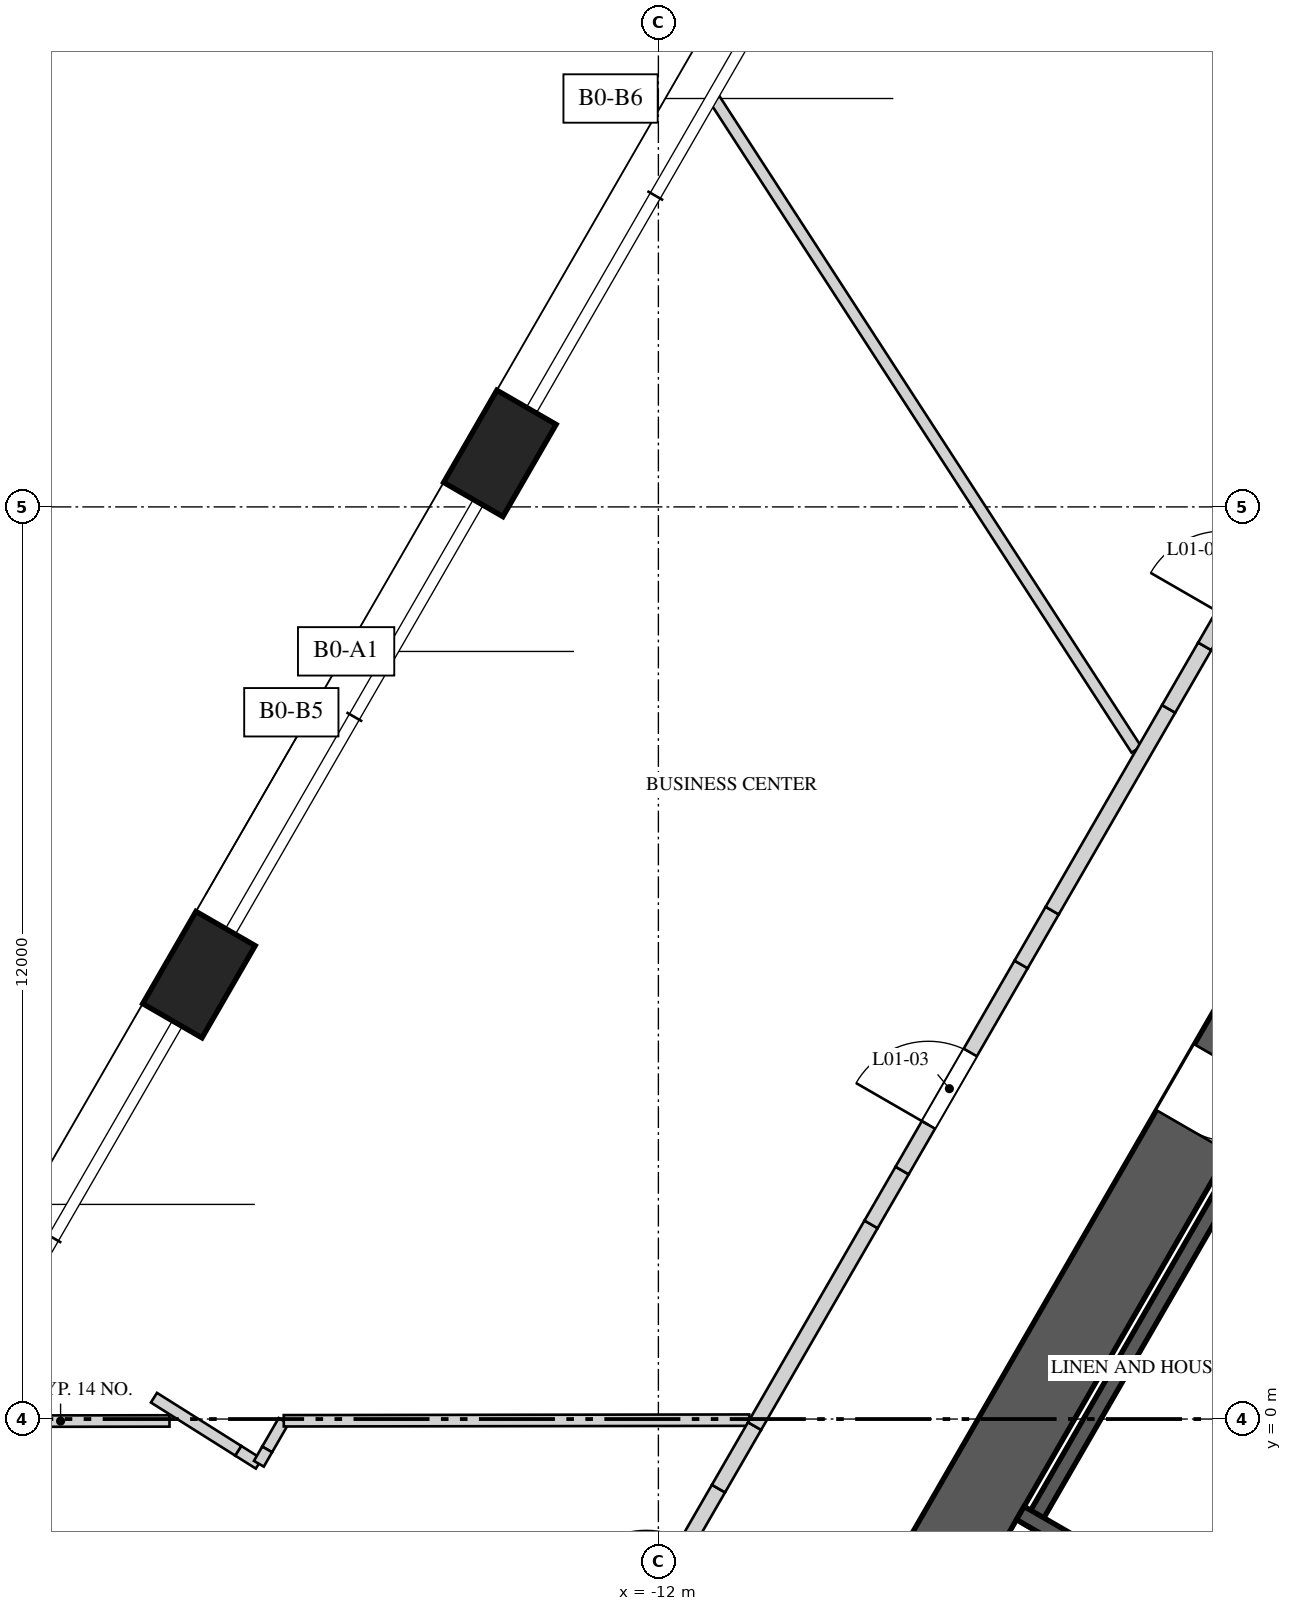
"""IFC4 building model, lengths in metres.
Left out: names, types, materials, properties, quantities, classifications, styles, units other than length and angle.
Written with IfcOpenShell. Run it as: python <this file> out.ifc"""

import sys

from ifc_helpers import new_model, si_unit, direction, frame, frame_2d, origin, origin_2d, place, context, subcontext, project, spatial, rectangle, extrude, element, fill, save


model = new_model("IFC4")
c1 = context("Model", 3, precision=1e-05, world=origin(), true_north=direction((0.0, 1.0)))
c2 = subcontext(c1, "Body", "Model", "MODEL_VIEW")
j1 = project(units=[si_unit("LENGTHUNIT", "METRE"), si_unit("PLANEANGLEUNIT", "RADIAN")], contexts=[c1])
p1 = place(None, origin())
s1 = spatial("IfcSite", under=j1, at=p1, CompositionType="ELEMENT")
p2 = place(p1, origin())
s2 = spatial("IfcBuilding", under=s1, at=p2, CompositionType="ELEMENT")
p3 = place(p2, frame((0.0, 0.0, 10.0)))
s3 = spatial("IfcBuildingStorey", under=s2, at=p3, CompositionType="ELEMENT", Elevation=10.0)
p4 = place(p3, frame((-1.126, 10.45, 0.0), z_axis=(0.0, 0.0, 1.0), x_axis=(-0.500001757713, -0.866024388966, 0.0)))
e1 = element("IfcWall", 1, at=p4, inside=s3, PredefinedType="SHEAR", context=c2, shape_type="SweptSolid", body=[
    extrude(rectangle(XDim=16.974, YDim=1.1, at=frame_2d((8.487, 0.0))), origin(), (0.0, 0.0, 1.0), 5.0),
])
p5 = place(p4, frame((6.692, 0.0, 0.0)))
e2 = element("IfcOpeningElement", 2, at=p5, cuts=e1, PredefinedType="OPENING", context=c2, shape_type="SweptSolid", body=[
    extrude(rectangle(XDim=1.0, YDim=2.4, at=frame_2d((0.5, 1.2))), frame((0.0, 0.56, 0.0), z_axis=(0.0, -1.0, 0.0), x_axis=(1.0, 0.0, 0.0)), (0.0, 0.0, 1.0), 1.12),
])
p6 = place(p4, frame((14.397, 0.0, 0.0)))
e3 = element("IfcOpeningElement", 3, at=p6, cuts=e1, PredefinedType="OPENING", context=c2, shape_type="SweptSolid", body=[
    extrude(rectangle(XDim=0.8, YDim=2.1, at=frame_2d((0.4, 1.05))), frame((0.0, 0.56, 0.0), z_axis=(0.0, -1.0, 0.0), x_axis=(1.0, 0.0, 0.0)), (0.0, 0.0, 1.0), 1.12),
])
for number, where, z_axis, x_axis in (
    (4, (-14.085, 12.704, 0.0), (0.0, 0.0, 1.0), (-0.5, -0.866, 0.0)),
    (5, (-18.044, 5.846, 0.0), (0.0, 0.0, 1.0), (-0.5, -0.866, 0.0)),
):
    element("IfcColumn", number, at=place(p3, frame(where, z_axis=z_axis, x_axis=x_axis)), inside=s3, PredefinedType="COLUMN", context=c2, shape_type="SweptSolid", body=[
        extrude(rectangle(XDim=1.4, YDim=0.9, at=origin_2d()), origin(), (0.0, 0.0, 1.0), 5.0),
    ])
p7 = place(p3, frame((-4.993, -2.648, 0.0), z_axis=(0.0, 0.0, 1.0), x_axis=(0.499996545922, 0.866027397988, 0.0)))
e6 = element("IfcWall", 6, at=p7, inside=s3, PredefinedType="SOLIDWALL", context=c2, shape_type="SweptSolid", body=[
    extrude(rectangle(XDim=5.5, YDim=0.2, at=frame_2d((2.75, 0.0))), origin(), (0.0, 0.0, 1.0), 4.65),
])
p8 = place(p7, frame((2.275, 0.0, 0.0)))
e7 = element("IfcOpeningElement", 7, at=p8, cuts=e6, PredefinedType="OPENING", context=c2, shape_type="SweptSolid", body=[
    extrude(rectangle(XDim=0.95, YDim=2.4, at=frame_2d((0.475, 1.2))), frame((0.0, 0.11, 0.0), z_axis=(0.0, -1.0, 0.0), x_axis=(1.0, 0.0, 0.0)), (0.0, 0.0, 1.0), 0.22),
])
p9 = place(p3, frame((-4.365, 3.34, 0.0), z_axis=(0.0, 0.0, 1.0), x_axis=(-0.499996545922, -0.866027397988, 0.0)))
e8 = element("IfcWall", 8, at=p9, inside=s3, PredefinedType="SOLIDWALL", context=c2, shape_type="SweptSolid", body=[
    extrude(rectangle(XDim=5.5, YDim=0.2, at=frame_2d((2.75, 0.0))), origin(), (0.0, 0.0, 1.0), 4.65),
])
p10 = place(p3, frame((-5.03, -2.512, 0.0), z_axis=(0.0, 0.0, 1.0), x_axis=(-0.865989465428, 0.500062241894, 0.0)))
e9 = element("IfcWall", 9, at=p10, inside=s3, PredefinedType="SOLIDWALL", context=c2, shape_type="SweptSolid", body=[
    extrude(rectangle(XDim=2.55, YDim=0.2, at=frame_2d((1.275, 0.0))), origin(), (0.0, 0.0, 1.0), 4.65),
])
p11 = place(p3, frame((-18.432, -0.025, 0.0), z_axis=(0.0, 0.0, 1.0), x_axis=(-0.999999071147, -0.001362976841, 0.0)))
e10 = element("IfcWall", 10, at=p11, inside=s3, PredefinedType="PARTITIONING", context=c2, shape_type="SweptSolid", body=[
    extrude(rectangle(XDim=2.866, YDim=0.15, at=frame_2d((1.433, 0.0))), origin(), (0.0, 0.0, 1.0), 4.65),
])
p12 = place(p3, frame((-17.256, -0.588, 0.0), z_axis=(0.0, 0.0, 1.0), x_axis=(-0.846156657223, 0.532934246823, 0.0)))
e11 = element("IfcWall", 11, at=p12, inside=s3, PredefinedType="PARTITIONING", context=c2, shape_type="SweptSolid", body=[
    extrude(rectangle(XDim=0.321, YDim=0.15, at=frame_2d((0.161, 0.0))), origin(), (0.0, 0.0, 1.0), 3.75),
])
p13 = place(p3, frame((-17.528, -0.417, 0.0), z_axis=(0.0, 0.0, 1.0), x_axis=(-0.846108327914, 0.533010973091, 0.0)))
e12 = element("IfcWall", 12, at=p13, inside=s3, PredefinedType="PARTITIONING", context=c2, shape_type="SweptSolid", body=[
    extrude(rectangle(XDim=1.31, YDim=0.15, at=frame_2d((0.655, 0.0))), origin(), (0.0, 0.0, 1.0), 4.65),
])
p14 = place(p3, frame((-16.93, -0.024, 0.0), z_axis=(0.0, 0.0, 1.0), x_axis=(-0.500193229689, -0.865913813825, 0.0)))
e13 = element("IfcWall", 13, at=p14, inside=s3, PredefinedType="PARTITIONING", context=c2, shape_type="SweptSolid", body=[
    extrude(rectangle(XDim=0.434, YDim=0.15, at=frame_2d((0.217, 0.0))), origin(), (0.0, 0.0, 1.0), 4.65),
])
p15 = place(p3, frame((-17.147, -0.4, 0.0), z_axis=(0.0, 0.0, 1.0), x_axis=(-0.499754787977, -0.866166930732, 0.0)))
e14 = element("IfcWall", 14, at=p15, inside=s3, PredefinedType="PARTITIONING", context=c2, shape_type="SweptSolid", body=[
    extrude(rectangle(XDim=0.218, YDim=0.15, at=frame_2d((0.109, 0.0))), origin(), (0.0, 0.0, 1.0), 3.75),
])
p16 = place(p3, frame((-10.805, -0.015, 0.0), z_axis=(0.0, 0.0, 1.0), x_axis=(-0.999999081238, -0.001355552538, 0.0)))
e15 = element("IfcWall", 15, at=p16, inside=s3, PredefinedType="PARTITIONING", context=c2, shape_type="SweptSolid", body=[
    extrude(rectangle(XDim=6.124, YDim=0.15, at=frame_2d((3.062, 0.0))), origin(), (0.0, 0.0, 1.0), 4.65),
])
p17 = place(p3, frame((-5.711, 8.808, 0.0), z_axis=(0.0, 0.0, 1.0), x_axis=(-0.544077203012, 0.839035158478, 0.0)))
e16 = element("IfcWall", 16, at=p17, inside=s3, PredefinedType="PARTITIONING", context=c2, shape_type="SweptSolid", body=[
    extrude(rectangle(XDim=10.194, YDim=0.15, at=frame_2d((5.097, 0.0))), origin(), (0.0, 0.0, 1.0), 4.65),
])
p18 = place(p3, frame((-12.617, -3.354, 0.0), z_axis=(0.0, 0.0, 1.0), x_axis=(0.49993514545, 0.866062844338, 0.0)))
e17 = element("IfcWall", 17, at=p18, inside=s3, PredefinedType="SOLIDWALL", context=c2, shape_type="SweptSolid", body=[
    extrude(rectangle(XDim=2.815, YDim=0.2, at=frame_2d((1.408, 0.0))), origin(), (0.0, 0.0, 1.0), 4.65),
])
p19 = place(p18, frame((0.912, 0.0, 0.0)))
e18 = element("IfcOpeningElement", 18, at=p19, cuts=e17, PredefinedType="OPENING", context=c2, shape_type="SweptSolid", body=[
    extrude(rectangle(XDim=1.1, YDim=2.4, at=frame_2d((0.55, 1.2))), frame((0.0, 0.11, 0.0), z_axis=(0.0, -1.0, 0.0), x_axis=(1.0, 0.0, 0.0)), (0.0, 0.0, 1.0), 0.22),
])
p20 = place(p3, frame((-11.209, -0.915, 0.0), z_axis=(0.0, 0.0, 1.0), x_axis=(0.500174821557, 0.865924446982, 0.0)))
e19 = element("IfcWall", 19, at=p20, inside=s3, PredefinedType="SOLIDWALL", context=c2, shape_type="SweptSolid", body=[
    extrude(rectangle(XDim=0.95, YDim=0.2, at=frame_2d((0.475, 0.0))), origin(), (0.0, 0.0, 1.0), 3.75),
])
p21 = place(p3, frame((-10.734, -0.093, 0.0), z_axis=(0.0, 0.0, 1.0), x_axis=(0.499952348839, 0.866052913447, 0.0)))
e20 = element("IfcWall", 20, at=p21, inside=s3, PredefinedType="SOLIDWALL", context=c2, shape_type="SweptSolid", body=[
    extrude(rectangle(XDim=3.064, YDim=0.2, at=frame_2d((1.532, 0.0))), origin(), (0.0, 0.0, 1.0), 4.65),
])
p22 = place(p3, frame((-9.202, 2.561, 0.0), z_axis=(0.0, 0.0, 1.0), x_axis=(0.500118501653, 0.865956976012, 0.0)))
e21 = element("IfcWall", 21, at=p22, inside=s3, PredefinedType="SOLIDWALL", context=c2, shape_type="SweptSolid", body=[
    extrude(rectangle(XDim=0.818, YDim=0.2, at=frame_2d((0.409, 0.0))), origin(), (0.0, 0.0, 1.0), 3.75),
])
p23 = place(p3, frame((-8.793, 3.27, 0.0), z_axis=(0.0, 0.0, 1.0), x_axis=(0.499947505232, 0.866055709532, 0.0)))
e22 = element("IfcWall", 22, at=p23, inside=s3, PredefinedType="SOLIDWALL", context=c2, shape_type="SweptSolid", body=[
    extrude(rectangle(XDim=3.13, YDim=0.2, at=frame_2d((1.565, 0.0))), origin(), (0.0, 0.0, 1.0), 4.65),
])
p24 = place(p23, frame((0.693, 0.0, 0.0)))
e23 = element("IfcOpeningElement", 23, at=p24, cuts=e22, PredefinedType="OPENING", context=c2, shape_type="SweptSolid", body=[
    extrude(rectangle(XDim=1.1, YDim=2.4, at=frame_2d((0.55, 1.2))), frame((0.0, 0.11, 0.0), z_axis=(0.0, -1.0, 0.0), x_axis=(1.0, 0.0, 0.0)), (0.0, 0.0, 1.0), 0.22),
])
p25 = place(p3, frame((-7.228, 5.98, 0.0), z_axis=(0.0, 0.0, 1.0), x_axis=(0.500118501653, 0.865956976012, 0.0)))
e24 = element("IfcWall", 24, at=p25, inside=s3, PredefinedType="SOLIDWALL", context=c2, shape_type="SweptSolid", body=[
    extrude(rectangle(XDim=0.818, YDim=0.2, at=frame_2d((0.409, 0.0))), origin(), (0.0, 0.0, 1.0), 3.75),
])
p26 = place(p3, frame((-6.819, 6.689, 0.0), z_axis=(0.0, 0.0, 1.0), x_axis=(0.499952348839, 0.866052913447, 0.0)))
e25 = element("IfcWall", 25, at=p26, inside=s3, PredefinedType="SOLIDWALL", context=c2, shape_type="SweptSolid", body=[
    extrude(rectangle(XDim=3.064, YDim=0.2, at=frame_2d((1.532, 0.0))), origin(), (0.0, 0.0, 1.0), 4.65),
])
p27 = place(p3, frame((-5.287, 9.343, 0.0), z_axis=(0.0, 0.0, 1.0), x_axis=(0.500174821557, 0.865924446982, 0.0)))
e26 = element("IfcWall", 26, at=p27, inside=s3, PredefinedType="SOLIDWALL", context=c2, shape_type="SweptSolid", body=[
    extrude(rectangle(XDim=0.95, YDim=0.2, at=frame_2d((0.475, 0.0))), origin(), (0.0, 0.0, 1.0), 3.75),
])
p28 = place(p3, frame((-4.812, 10.165, 0.0), z_axis=(0.0, 0.0, 1.0), x_axis=(0.500000186108, 0.866025296335, 0.0)))
e27 = element("IfcWall", 27, at=p28, inside=s3, PredefinedType="SOLIDWALL", context=c2, shape_type="SweptSolid", body=[
    extrude(rectangle(XDim=2.815, YDim=0.2, at=frame_2d((1.408, 0.0))), origin(), (0.0, 0.0, 1.0), 4.65),
])
p29 = place(p28, frame((0.482, 0.0, 0.0)))
e28 = element("IfcOpeningElement", 28, at=p29, cuts=e27, PredefinedType="OPENING", context=c2, shape_type="SweptSolid", body=[
    extrude(rectangle(XDim=1.1, YDim=2.4, at=frame_2d((0.55, 1.2))), frame((0.0, 0.11, 0.0), z_axis=(0.0, -1.0, 0.0), x_axis=(1.0, 0.0, 0.0)), (0.0, 0.0, 1.0), 0.22),
])
p30 = place(p5, origin())
e29 = element("IfcDoor", 29, at=p30, inside=s3, OperationType="SINGLE_SWING_LEFT", PredefinedType="DOOR", context=c2, shape_type="SweptSolid", body=[
    extrude(rectangle(XDim=1.0, YDim=2.4, at=frame_2d((0.5, 1.2))), frame((0.0, 0.025, 0.0), z_axis=(0.0, -1.0, 0.0), x_axis=(1.0, 0.0, 0.0)), (0.0, 0.0, 1.0), 0.05),
])
fill(e2, e29)
p31 = place(p24, origin())
e30 = element("IfcDoor", 30, at=p31, inside=s3, OperationType="SINGLE_SWING_LEFT", PredefinedType="DOOR", context=c2, shape_type="SweptSolid", body=[
    extrude(rectangle(XDim=1.1, YDim=2.4, at=frame_2d((0.55, 1.2))), frame((0.0, 0.025, 0.0), z_axis=(0.0, -1.0, 0.0), x_axis=(1.0, 0.0, 0.0)), (0.0, 0.0, 1.0), 0.05),
])
fill(e23, e30)
save(model, sys.argv[1])
